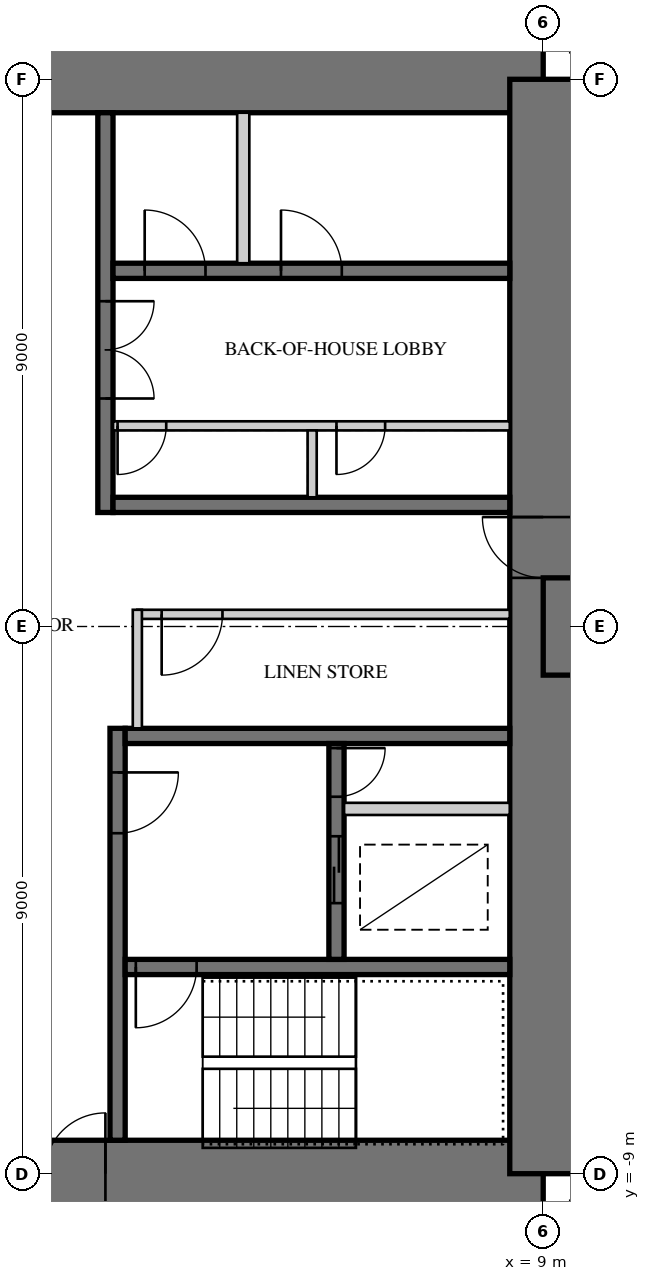
"""IFC4 building model, lengths in metres.
Left out: names, types, materials, properties, quantities, classifications, styles, units other than length and angle.
Written with IfcOpenShell. Run it as: python <this file> out.ifc"""

import sys

from ifc_helpers import new_model, si_unit, direction, frame, frame_2d, origin, place, context, subcontext, project, spatial, rectangle, extrude, element, fill, save


model = new_model("IFC4")
c1 = context("Model", 3, precision=1e-05, world=origin(), true_north=direction((0.0, 1.0)))
c2 = subcontext(c1, "Body", "Model", "MODEL_VIEW")
j1 = project(units=[si_unit("LENGTHUNIT", "METRE"), si_unit("PLANEANGLEUNIT", "RADIAN")], contexts=[c1])
p1 = place(None, origin())
s1 = spatial("IfcSite", under=j1, at=p1, CompositionType="ELEMENT")
p2 = place(p1, origin())
s2 = spatial("IfcBuilding", under=s1, at=p2, CompositionType="ELEMENT")
p3 = place(p2, frame((0.0, 0.0, 172.9)))
s3 = spatial("IfcBuildingStorey", under=s2, at=p3, CompositionType="ELEMENT", Elevation=172.9)
p4 = place(p3, frame((9.0, 9.0, 0.0), z_axis=(0.0, 0.0, 1.0), x_axis=(-1.0, 0.0, 0.0)))
e1 = element("IfcWall", 1, at=p4, inside=s3, PredefinedType="SHEAR", context=c2, shape_type="SweptSolid", body=[
    extrude(rectangle(XDim=18.0, YDim=1.1, at=frame_2d((9.0, 0.0))), origin(), (0.0, 0.0, 1.0), 3.4),
])
p5 = place(p4, frame((9.8, 0.0, 0.0)))
e2 = element("IfcOpeningElement", 2, at=p5, cuts=e1, PredefinedType="OPENING", context=c2, shape_type="SweptSolid", body=[
    extrude(rectangle(XDim=1.0, YDim=2.4, at=frame_2d((0.5, 1.2))), frame((0.0, 0.56, 0.0), z_axis=(0.0, -1.0, 0.0), x_axis=(1.0, 0.0, 0.0)), (0.0, 0.0, 1.0), 1.12),
])
p6 = place(p3, frame((-9.0, -9.0, 0.0), z_axis=(0.0, 0.0, 1.0), x_axis=(1.0, 0.0, 0.0)))
e3 = element("IfcWall", 3, at=p6, inside=s3, PredefinedType="SHEAR", context=c2, shape_type="SweptSolid", body=[
    extrude(rectangle(XDim=18.0, YDim=1.1, at=frame_2d((9.0, 0.0))), origin(), (0.0, 0.0, 1.0), 3.4),
])
p7 = place(p6, frame((9.8, 0.0, 0.0)))
e4 = element("IfcOpeningElement", 4, at=p7, cuts=e3, PredefinedType="OPENING", context=c2, shape_type="SweptSolid", body=[
    extrude(rectangle(XDim=1.0, YDim=2.4, at=frame_2d((0.5, 1.2))), frame((0.0, 0.56, 0.0), z_axis=(0.0, -1.0, 0.0), x_axis=(1.0, 0.0, 0.0)), (0.0, 0.0, 1.0), 1.12),
])
p8 = place(p3, frame((9.0, -9.0, 0.0), z_axis=(0.0, 0.0, 1.0), x_axis=(0.0, 1.0, 0.0)))
e5 = element("IfcWall", 5, at=p8, inside=s3, PredefinedType="SHEAR", context=c2, shape_type="SweptSolid", body=[
    extrude(rectangle(XDim=18.0, YDim=1.1, at=frame_2d((9.0, 0.0))), origin(), (0.0, 0.0, 1.0), 3.4),
])
p9 = place(p8, frame((9.8, 0.0, 0.0)))
e6 = element("IfcOpeningElement", 6, at=p9, cuts=e5, PredefinedType="OPENING", context=c2, shape_type="SweptSolid", body=[
    extrude(rectangle(XDim=1.0, YDim=2.4, at=frame_2d((0.5, 1.2))), frame((0.0, 0.56, 0.0), z_axis=(0.0, -1.0, 0.0), x_axis=(1.0, 0.0, 0.0)), (0.0, 0.0, 1.0), 1.12),
])
p10 = place(p3, frame((1.8, 1.875, 0.0), z_axis=(0.0, 0.0, 1.0), x_axis=(0.0, 1.0, 0.0)))
e7 = element("IfcWall", 7, at=p10, inside=s3, PredefinedType="SHEAR", context=c2, shape_type="SweptSolid", body=[
    extrude(rectangle(XDim=6.575, YDim=0.25, at=frame_2d((3.288, 0.0))), origin(), (0.0, 0.0, 1.0), 3.4),
])
p11 = place(p10, frame((1.875, 0.0, 0.0)))
e8 = element("IfcOpeningElement", 8, at=p11, cuts=e7, PredefinedType="OPENING", context=c2, shape_type="SweptSolid", body=[
    extrude(rectangle(XDim=1.6, YDim=2.4, at=frame_2d((0.8, 1.2))), frame((0.0, 0.135, 0.0), z_axis=(0.0, -1.0, 0.0), x_axis=(1.0, 0.0, 0.0)), (0.0, 0.0, 1.0), 0.27),
])
p12 = place(p3, frame((1.925, 2.0, 0.0), z_axis=(0.0, 0.0, 1.0), x_axis=(1.0, 0.0, 0.0)))
e9 = element("IfcWall", 9, at=p12, inside=s3, PredefinedType="SHEAR", context=c2, shape_type="SweptSolid", body=[
    extrude(rectangle(XDim=6.525, YDim=0.25, at=frame_2d((3.262, 0.0))), origin(), (0.0, 0.0, 1.0), 3.4),
])
p13 = place(p3, frame((1.925, 5.85, 0.0), z_axis=(0.0, 0.0, 1.0), x_axis=(1.0, 0.0, 0.0)))
e10 = element("IfcWall", 10, at=p13, inside=s3, PredefinedType="SHEAR", context=c2, shape_type="SweptSolid", body=[
    extrude(rectangle(XDim=6.525, YDim=0.25, at=frame_2d((3.262, 0.0))), origin(), (0.0, 0.0, 1.0), 3.4),
])
p14 = place(p13, frame((0.521, 0.0, 0.0)))
e11 = element("IfcOpeningElement", 11, at=p14, cuts=e10, PredefinedType="OPENING", context=c2, shape_type="SweptSolid", body=[
    extrude(rectangle(XDim=1.0, YDim=2.1, at=frame_2d((0.5, 1.05))), frame((0.0, 0.135, 0.0), z_axis=(0.0, -1.0, 0.0), x_axis=(1.0, 0.0, 0.0)), (0.0, 0.0, 1.0), 0.27),
])
p15 = place(p13, frame((2.762, 0.0, 0.0)))
e12 = element("IfcOpeningElement", 12, at=p15, cuts=e10, PredefinedType="OPENING", context=c2, shape_type="SweptSolid", body=[
    extrude(rectangle(XDim=1.0, YDim=2.1, at=frame_2d((0.5, 1.05))), frame((0.0, 0.135, 0.0), z_axis=(0.0, -1.0, 0.0), x_axis=(1.0, 0.0, 0.0)), (0.0, 0.0, 1.0), 0.27),
])
p16 = place(p3, frame((1.925, 3.3, 0.0), z_axis=(0.0, 0.0, 1.0), x_axis=(1.0, 0.0, 0.0)))
e13 = element("IfcWall", 13, at=p16, inside=s3, PredefinedType="PARTITIONING", context=c2, shape_type="SweptSolid", body=[
    extrude(rectangle(XDim=6.525, YDim=0.15, at=frame_2d((3.262, 0.0))), origin(), (0.0, 0.0, 1.0), 3.4),
])
p17 = place(p16, frame((0.075, 0.0, 0.0)))
e14 = element("IfcOpeningElement", 14, at=p17, cuts=e13, PredefinedType="OPENING", context=c2, shape_type="SweptSolid", body=[
    extrude(rectangle(XDim=0.8, YDim=2.1, at=frame_2d((0.4, 1.05))), frame((0.0, 0.085, 0.0), z_axis=(0.0, -1.0, 0.0), x_axis=(1.0, 0.0, 0.0)), (0.0, 0.0, 1.0), 0.17),
])
p18 = place(p16, frame((3.675, 0.0, 0.0)))
e15 = element("IfcOpeningElement", 15, at=p18, cuts=e13, PredefinedType="OPENING", context=c2, shape_type="SweptSolid", body=[
    extrude(rectangle(XDim=0.8, YDim=2.1, at=frame_2d((0.4, 1.05))), frame((0.0, 0.085, 0.0), z_axis=(0.0, -1.0, 0.0), x_axis=(1.0, 0.0, 0.0)), (0.0, 0.0, 1.0), 0.17),
])
p19 = place(p3, frame((5.2, 2.125, 0.0), z_axis=(0.0, 0.0, 1.0), x_axis=(0.0, 1.0, 0.0)))
e16 = element("IfcWall", 16, at=p19, inside=s3, PredefinedType="PARTITIONING", context=c2, shape_type="SweptSolid", body=[
    extrude(rectangle(XDim=1.1, YDim=0.15, at=frame_2d((0.55, 0.0))), origin(), (0.0, 0.0, 1.0), 3.4),
])
p20 = place(p3, frame((4.067, 5.975, 0.0), z_axis=(0.0, 0.0, 1.0), x_axis=(0.0, 1.0, 0.0)))
e17 = element("IfcWall", 17, at=p20, inside=s3, PredefinedType="PARTITIONING", context=c2, shape_type="SweptSolid", body=[
    extrude(rectangle(XDim=2.475, YDim=0.2, at=frame_2d((1.237, 0.0))), origin(), (0.0, 0.0, 1.0), 3.4),
])
p21 = place(p3, frame((2.0, -1.675, 0.0), z_axis=(0.0, 0.0, 1.0), x_axis=(0.0, -1.0, 0.0)))
e18 = element("IfcWall", 18, at=p21, inside=s3, PredefinedType="SHEAR", context=c2, shape_type="SweptSolid", body=[
    extrude(rectangle(XDim=6.775, YDim=0.25, at=frame_2d((3.387, 0.0))), origin(), (0.0, 0.0, 1.0), 3.4),
])
p22 = place(p21, frame((0.725, 0.0, 0.0)))
e19 = element("IfcOpeningElement", 19, at=p22, cuts=e18, PredefinedType="OPENING", context=c2, shape_type="SweptSolid", body=[
    extrude(rectangle(XDim=1.0, YDim=2.1, at=frame_2d((0.5, 1.05))), frame((0.0, 0.135, 0.0), z_axis=(0.0, -1.0, 0.0), x_axis=(1.0, 0.0, 0.0)), (0.0, 0.0, 1.0), 0.27),
])
p23 = place(p3, frame((2.125, -1.8, 0.0), z_axis=(0.0, 0.0, 1.0), x_axis=(1.0, 0.0, 0.0)))
e20 = element("IfcWall", 20, at=p23, inside=s3, PredefinedType="SHEAR", context=c2, shape_type="SweptSolid", body=[
    extrude(rectangle(XDim=6.325, YDim=0.25, at=frame_2d((3.163, 0.0))), origin(), (0.0, 0.0, 1.0), 3.4),
])
p24 = place(p3, frame((2.125, -5.6, 0.0), z_axis=(0.0, 0.0, 1.0), x_axis=(1.0, 0.0, 0.0)))
e21 = element("IfcWall", 21, at=p24, inside=s3, PredefinedType="SHEAR", context=c2, shape_type="SweptSolid", body=[
    extrude(rectangle(XDim=6.325, YDim=0.25, at=frame_2d((3.163, 0.0))), origin(), (0.0, 0.0, 1.0), 3.4),
])
p25 = place(p24, frame((0.175, 0.0, 0.0)))
e22 = element("IfcOpeningElement", 22, at=p25, cuts=e21, PredefinedType="OPENING", context=c2, shape_type="SweptSolid", body=[
    extrude(rectangle(XDim=1.0, YDim=2.1, at=frame_2d((0.5, 1.05))), frame((0.0, 0.135, 0.0), z_axis=(0.0, -1.0, 0.0), x_axis=(1.0, 0.0, 0.0)), (0.0, 0.0, 1.0), 0.27),
])
p26 = place(p3, frame((5.6, -1.925, 0.0), z_axis=(0.0, 0.0, 1.0), x_axis=(0.0, -1.0, 0.0)))
e23 = element("IfcWall", 23, at=p26, inside=s3, PredefinedType="SHEAR", context=c2, shape_type="SweptSolid", body=[
    extrude(rectangle(XDim=3.55, YDim=0.25, at=frame_2d((1.775, 0.0))), origin(), (0.0, 0.0, 1.0), 3.4),
])
p27 = place(p26, frame((1.525, 0.0, 0.0)))
e24 = element("IfcOpeningElement", 24, at=p27, cuts=e23, PredefinedType="OPENING", context=c2, shape_type="SweptSolid", body=[
    extrude(rectangle(XDim=1.1, YDim=2.2, at=frame_2d((0.55, 1.1))), frame((0.0, 0.135, 0.0), z_axis=(0.0, -1.0, 0.0), x_axis=(1.0, 0.0, 0.0)), (0.0, 0.0, 1.0), 0.27),
])
p28 = place(p26, frame((0.075, 0.0, 0.0)))
e25 = element("IfcOpeningElement", 25, at=p28, cuts=e23, PredefinedType="OPENING", context=c2, shape_type="SweptSolid", body=[
    extrude(rectangle(XDim=0.8, YDim=2.1, at=frame_2d((0.4, 1.05))), frame((0.0, 0.135, 0.0), z_axis=(0.0, -1.0, 0.0), x_axis=(1.0, 0.0, 0.0)), (0.0, 0.0, 1.0), 0.27),
])
p29 = place(p3, frame((5.725, -3.0, 0.0), z_axis=(0.0, 0.0, 1.0), x_axis=(1.0, 0.0, 0.0)))
e26 = element("IfcWall", 26, at=p29, inside=s3, PredefinedType="PARTITIONING", context=c2, shape_type="SweptSolid", body=[
    extrude(rectangle(XDim=2.725, YDim=0.2, at=frame_2d((1.362, 0.0))), origin(), (0.0, 0.0, 1.0), 3.4),
])
p30 = place(p3, frame((9.0, 0.0, 0.0), z_axis=(0.0, 0.0, 1.0), x_axis=(1.0, 0.0, 0.0)))
e27 = element("IfcWall", 27, at=p30, inside=s3, PredefinedType="SHEAR", context=c2, shape_type="SweptSolid", body=[
    extrude(rectangle(XDim=9.0, YDim=1.6, at=frame_2d((4.5, 0.0))), origin(), (0.0, 0.0, 1.0), 3.4),
])
p31 = place(p30, frame((3.95, 0.0, 0.0)))
e28 = element("IfcOpeningElement", 28, at=p31, cuts=e27, PredefinedType="OPENING", context=c2, shape_type="SweptSolid", body=[
    extrude(rectangle(XDim=1.0, YDim=2.15, at=frame_2d((0.5, 1.075))), frame((0.0, 0.81, 0.0), z_axis=(0.0, -1.0, 0.0), x_axis=(1.0, 0.0, 0.0)), (0.0, 0.0, 1.0), 1.62),
])
p32 = place(p30, frame((7.0, 0.0, 0.0)))
e29 = element("IfcOpeningElement", 29, at=p32, cuts=e27, PredefinedType="OPENING", context=c2, shape_type="SweptSolid", body=[
    extrude(rectangle(XDim=1.0, YDim=2.2, at=frame_2d((0.5, 1.1))), frame((0.0, 0.81, 0.0), z_axis=(0.0, -1.0, 0.0), x_axis=(1.0, 0.0, 0.0)), (0.0, 0.0, 1.0), 1.62),
])
p33 = place(p3, frame((9.445, -9.57, 0.0), z_axis=(0.0, 0.0, 1.0), x_axis=(1.0, 0.0, 0.0)))
e30 = element("IfcWall", 30, at=p33, inside=s3, PredefinedType="SOLIDWALL", context=c2, shape_type="SweptSolid", body=[
    extrude(rectangle(XDim=3.125, YDim=0.25, at=frame_2d((1.562, 0.0))), origin(), (0.0, 0.0, 1.0), 3.22),
])
p34 = place(p33, frame((0.6, 0.0, 0.0)))
e31 = element("IfcOpeningElement", 31, at=p34, cuts=e30, PredefinedType="OPENING", context=c2, shape_type="SweptSolid", body=[
    extrude(rectangle(XDim=1.0, YDim=2.2, at=frame_2d((0.5, 1.1))), frame((0.0, 0.135, 0.0), z_axis=(0.0, -1.0, 0.0), x_axis=(1.0, 0.0, 0.0)), (0.0, 0.0, 1.0), 0.27),
])
p35 = place(p3, frame((9.57, 9.445, 0.0), z_axis=(0.0, 0.0, 1.0), x_axis=(0.0, 1.0, 0.0)))
e32 = element("IfcWall", 32, at=p35, inside=s3, PredefinedType="SOLIDWALL", context=c2, shape_type="SweptSolid", body=[
    extrude(rectangle(XDim=3.125, YDim=0.25, at=frame_2d((1.562, 0.0))), origin(), (0.0, 0.0, 1.0), 3.22),
])
p36 = place(p35, frame((0.6, 0.0, 0.0)))
e33 = element("IfcOpeningElement", 33, at=p36, cuts=e32, PredefinedType="OPENING", context=c2, shape_type="SweptSolid", body=[
    extrude(rectangle(XDim=1.0, YDim=2.2, at=frame_2d((0.5, 1.1))), frame((0.0, 0.135, 0.0), z_axis=(0.0, -1.0, 0.0), x_axis=(1.0, 0.0, 0.0)), (0.0, 0.0, 1.0), 0.27),
])
p37 = place(p3, frame((2.325, 0.2, 0.0), z_axis=(0.0, 0.0, 1.0), x_axis=(1.0, 0.0, 0.0)))
e34 = element("IfcWall", 34, at=p37, inside=s3, PredefinedType="PARTITIONING", context=c2, shape_type="SweptSolid", body=[
    extrude(rectangle(XDim=6.125, YDim=0.15, at=frame_2d((3.062, 0.0))), origin(), (0.0, 0.0, 1.0), 3.22),
])
p38 = place(p37, frame((0.4, 0.0, 0.0)))
e35 = element("IfcOpeningElement", 35, at=p38, cuts=e34, PredefinedType="OPENING", context=c2, shape_type="SweptSolid", body=[
    extrude(rectangle(XDim=1.0, YDim=2.1, at=frame_2d((0.5, 1.05))), frame((0.0, 0.085, 0.0), z_axis=(0.0, -1.0, 0.0), x_axis=(1.0, 0.0, 0.0)), (0.0, 0.0, 1.0), 0.17),
])
p39 = place(p3, frame((2.325, -1.675, 0.0), z_axis=(0.0, 0.0, 1.0), x_axis=(0.0, 1.0, 0.0)))
e36 = element("IfcWall", 36, at=p39, inside=s3, PredefinedType="PARTITIONING", context=c2, shape_type="SweptSolid", body=[
    extrude(rectangle(XDim=1.95, YDim=0.15, at=frame_2d((0.975, 0.0))), origin(), (0.0, 0.0, 1.0), 3.22),
])
p40 = place(p38, frame((1.0, 0.0, 0.0), z_axis=(0.0, 0.0, 1.0), x_axis=(-1.0, 0.0, 0.0)))
e37 = element("IfcDoor", 37, at=p40, inside=s3, OperationType="SINGLE_SWING_RIGHT", PredefinedType="DOOR", context=c2, shape_type="SweptSolid", body=[
    extrude(rectangle(XDim=1.0, YDim=2.1, at=frame_2d((0.5, 1.05))), frame((0.0, 0.025, 0.0), z_axis=(0.0, -1.0, 0.0), x_axis=(1.0, 0.0, 0.0)), (0.0, 0.0, 1.0), 0.05),
])
fill(e35, e37)
p41 = place(p7, origin())
e38 = element("IfcDoor", 38, at=p41, inside=s3, OperationType="SINGLE_SWING_RIGHT", PredefinedType="DOOR", context=c2, shape_type="SweptSolid", body=[
    extrude(rectangle(XDim=1.0, YDim=2.4, at=frame_2d((0.5, 1.2))), frame((0.0, 0.055, 0.0), z_axis=(0.0, -1.0, 0.0), x_axis=(1.0, 0.0, 0.0)), (0.0, 0.0, 1.0), 0.05),
])
fill(e4, e38)
p42 = place(p9, origin())
e39 = element("IfcDoor", 39, at=p42, inside=s3, OperationType="SINGLE_SWING_RIGHT", PredefinedType="DOOR", context=c2, shape_type="SweptSolid", body=[
    extrude(rectangle(XDim=1.0, YDim=2.4, at=frame_2d((0.5, 1.2))), frame((0.0, 0.055, 0.0), z_axis=(0.0, -1.0, 0.0), x_axis=(1.0, 0.0, 0.0)), (0.0, 0.0, 1.0), 0.05),
])
fill(e6, e39)
p43 = place(p11, frame((1.6, 0.0, 0.0), z_axis=(0.0, 0.0, 1.0), x_axis=(-1.0, 0.0, 0.0)))
e40 = element("IfcDoor", 40, at=p43, inside=s3, OperationType="DOUBLE_DOOR_SINGLE_SWING", PredefinedType="DOOR", context=c2, shape_type="SweptSolid", body=[
    extrude(rectangle(XDim=1.6, YDim=2.4, at=frame_2d((0.8, 1.2))), frame((0.0, 0.025, 0.0), z_axis=(0.0, -1.0, 0.0), x_axis=(1.0, 0.0, 0.0)), (0.0, 0.0, 1.0), 0.05),
])
fill(e8, e40)
p44 = place(p17, frame((0.8, 0.0, 0.0), z_axis=(0.0, 0.0, 1.0), x_axis=(-1.0, 0.0, 0.0)))
e41 = element("IfcDoor", 41, at=p44, inside=s3, OperationType="SINGLE_SWING_RIGHT", PredefinedType="DOOR", context=c2, shape_type="SweptSolid", body=[
    extrude(rectangle(XDim=0.8, YDim=2.1, at=frame_2d((0.4, 1.05))), frame((0.0, 0.025, 0.0), z_axis=(0.0, -1.0, 0.0), x_axis=(1.0, 0.0, 0.0)), (0.0, 0.0, 1.0), 0.05),
])
fill(e14, e41)
p45 = place(p18, frame((0.8, 0.0, 0.0), z_axis=(0.0, 0.0, 1.0), x_axis=(-1.0, 0.0, 0.0)))
e42 = element("IfcDoor", 42, at=p45, inside=s3, OperationType="SINGLE_SWING_RIGHT", PredefinedType="DOOR", context=c2, shape_type="SweptSolid", body=[
    extrude(rectangle(XDim=0.8, YDim=2.1, at=frame_2d((0.4, 1.05))), frame((0.0, 0.025, 0.0), z_axis=(0.0, -1.0, 0.0), x_axis=(1.0, 0.0, 0.0)), (0.0, 0.0, 1.0), 0.05),
])
fill(e15, e42)
p46 = place(p22, origin())
e43 = element("IfcDoor", 43, at=p46, inside=s3, OperationType="SINGLE_SWING_LEFT", PredefinedType="DOOR", context=c2, shape_type="SweptSolid", body=[
    extrude(rectangle(XDim=1.0, YDim=2.1, at=frame_2d((0.5, 1.05))), frame((0.0, 0.025, 0.0), z_axis=(0.0, -1.0, 0.0), x_axis=(1.0, 0.0, 0.0)), (0.0, 0.0, 1.0), 0.05),
])
fill(e19, e43)
p47 = place(p25, frame((1.0, 0.0, 0.0), z_axis=(0.0, 0.0, 1.0), x_axis=(-1.0, 0.0, 0.0)))
e44 = element("IfcDoor", 44, at=p47, inside=s3, OperationType="SINGLE_SWING_RIGHT", PredefinedType="DOOR", context=c2, shape_type="SweptSolid", body=[
    extrude(rectangle(XDim=1.0, YDim=2.1, at=frame_2d((0.5, 1.05))), frame((0.0, 0.025, 0.0), z_axis=(0.0, -1.0, 0.0), x_axis=(1.0, 0.0, 0.0)), (0.0, 0.0, 1.0), 0.05),
])
fill(e22, e44)
p48 = place(p27, origin())
e45 = element("IfcDoor", 45, at=p48, inside=s3, OperationType="DOUBLE_DOOR_SLIDING", PredefinedType="DOOR", context=c2, shape_type="SweptSolid", body=[
    extrude(rectangle(XDim=1.1, YDim=2.2, at=frame_2d((0.55, 1.1))), frame((0.0, 0.025, 0.0), z_axis=(0.0, -1.0, 0.0), x_axis=(1.0, 0.0, 0.0)), (0.0, 0.0, 1.0), 0.05),
])
fill(e24, e45)
p49 = place(p28, origin())
e46 = element("IfcDoor", 46, at=p49, inside=s3, OperationType="SINGLE_SWING_LEFT", PredefinedType="DOOR", context=c2, shape_type="SweptSolid", body=[
    extrude(rectangle(XDim=0.8, YDim=2.1, at=frame_2d((0.4, 1.05))), frame((0.0, 0.025, 0.0), z_axis=(0.0, -1.0, 0.0), x_axis=(1.0, 0.0, 0.0)), (0.0, 0.0, 1.0), 0.05),
])
fill(e25, e46)
p50 = place(p14, origin())
e47 = element("IfcDoor", 47, at=p50, inside=s3, OperationType="SINGLE_SWING_LEFT", PredefinedType="DOOR", context=c2, shape_type="SweptSolid", body=[
    extrude(rectangle(XDim=1.0, YDim=2.1, at=frame_2d((0.5, 1.05))), frame((0.0, 0.025, 0.0), z_axis=(0.0, -1.0, 0.0), x_axis=(1.0, 0.0, 0.0)), (0.0, 0.0, 1.0), 0.05),
])
fill(e11, e47)
p51 = place(p15, origin())
e48 = element("IfcDoor", 48, at=p51, inside=s3, OperationType="SINGLE_SWING_LEFT", PredefinedType="DOOR", context=c2, shape_type="SweptSolid", body=[
    extrude(rectangle(XDim=1.0, YDim=2.1, at=frame_2d((0.5, 1.05))), frame((0.0, 0.025, 0.0), z_axis=(0.0, -1.0, 0.0), x_axis=(1.0, 0.0, 0.0)), (0.0, 0.0, 1.0), 0.05),
])
fill(e12, e48)
save(model, sys.argv[1])
